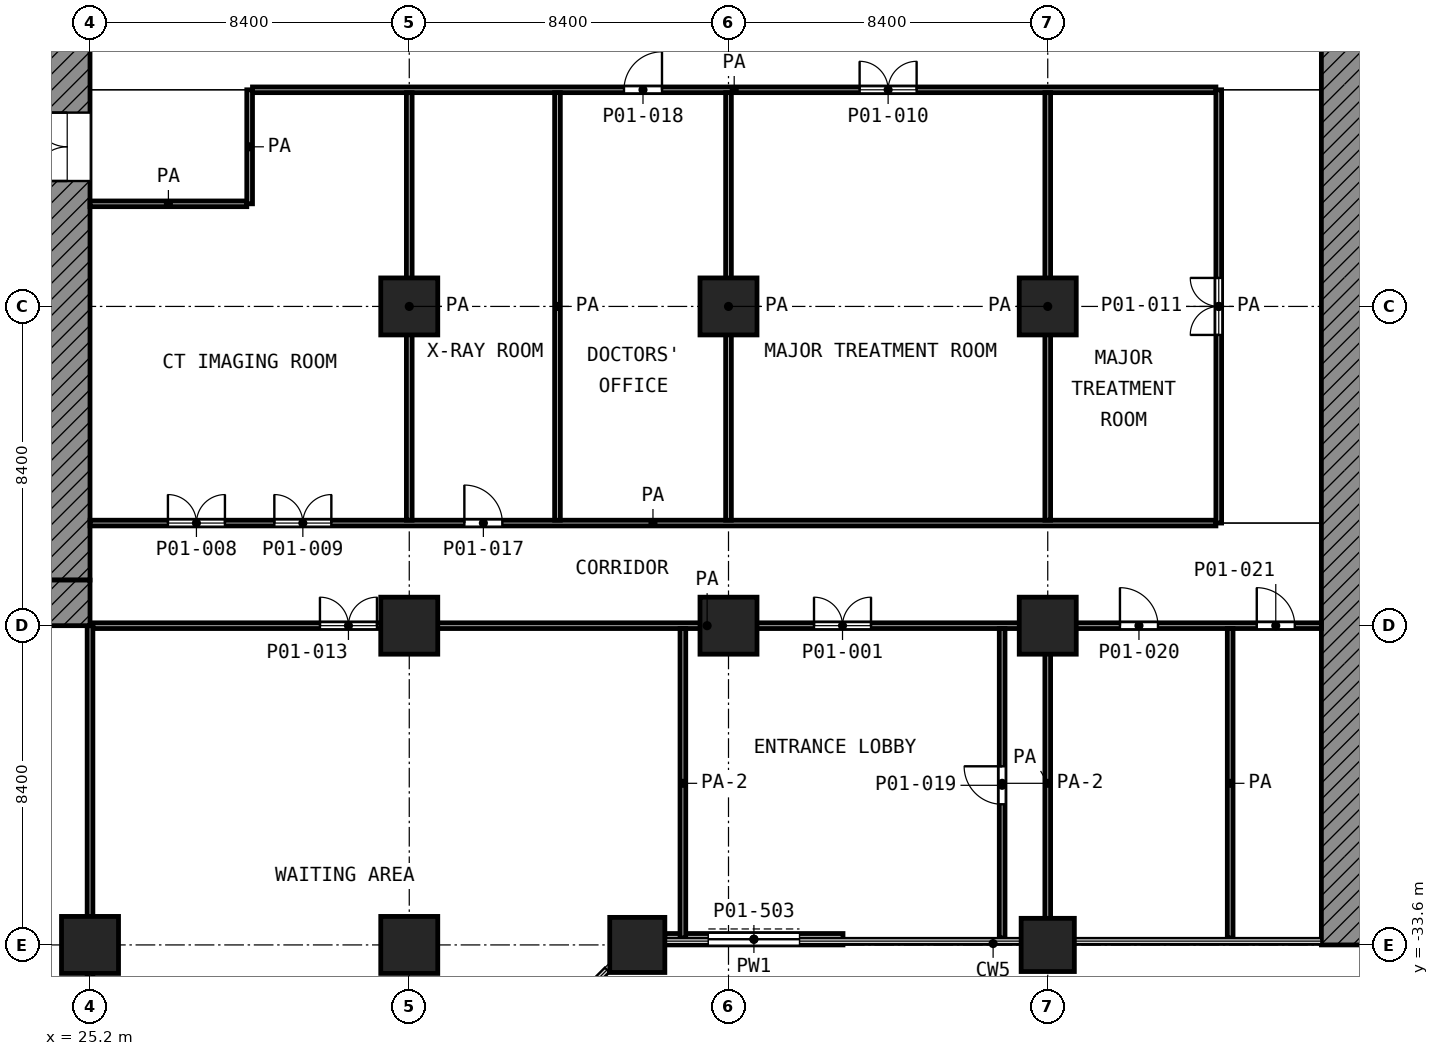
"""IFC4 building model, lengths in metres.
Left out: names, types, materials, properties, quantities, classifications, styles, units other than length and angle.
Written with IfcOpenShell. Run it as: python <this file> out.ifc"""

import sys

from ifc_helpers import new_model, si_unit, direction, frame, frame_2d, origin, origin_2d, place, context, subcontext, project, spatial, polyline, rectangle, outline, extrude, element, fill, save


model = new_model("IFC4")
c1 = context("Model", 3, precision=1e-05, world=origin(), true_north=direction((0.0, 1.0)))
c2 = subcontext(c1, "Body", "Model", "MODEL_VIEW")
j1 = project(units=[si_unit("LENGTHUNIT", "METRE"), si_unit("PLANEANGLEUNIT", "RADIAN")], contexts=[c1])
p1 = place(None, origin())
s1 = spatial("IfcSite", under=j1, at=p1, CompositionType="ELEMENT")
p2 = place(p1, origin())
s2 = spatial("IfcBuilding", under=s1, at=p2, CompositionType="ELEMENT")
p3 = place(p2, origin())
s3 = spatial("IfcBuildingStorey", under=s2, at=p3, CompositionType="ELEMENT", Elevation=0.0)
for number, where, z_axis, x_axis in (
    (1, (33.6, -16.8, 0.0), (0.0, 0.0, 1.0), (1.0, 0.0, 0.0)),
    (2, (42.0, -16.8, 0.0), (0.0, 0.0, 1.0), (1.0, 0.0, 0.0)),
    (3, (50.4, -16.8, 0.0), (0.0, 0.0, 1.0), (1.0, 0.0, 0.0)),
    (4, (33.6, -25.2, 0.0), (0.0, 0.0, 1.0), (1.0, 0.0, 0.0)),
    (5, (42.0, -25.2, 0.0), (0.0, 0.0, 1.0), (1.0, 0.0, 0.0)),
    (6, (50.4, -25.2, 0.0), (0.0, 0.0, 1.0), (1.0, 0.0, 0.0)),
    (7, (25.2, -33.6, 0.0), (0.0, 0.0, 1.0), (1.0, 0.0, 0.0)),
    (8, (33.6, -33.6, 0.0), (0.0, 0.0, 1.0), (1.0, 0.0, 0.0)),
):
    element("IfcColumn", number, at=place(p3, frame(where, z_axis=z_axis, x_axis=x_axis)), inside=s3, PredefinedType="COLUMN", context=c2, shape_type="SweptSolid", body=[
        extrude(rectangle(XDim=1.5, YDim=1.5, at=origin_2d()), origin(), (0.0, 0.0, 1.0), 7.0),
    ])
p4 = place(p3, frame((39.6, -33.6, 0.0), z_axis=(0.0, 0.0, 1.0), x_axis=(1.0, 0.0, 0.0)))
e9 = element("IfcColumn", 9, at=p4, inside=s3, PredefinedType="COLUMN", context=c2, shape_type="SweptSolid", body=[
    extrude(rectangle(XDim=1.45, YDim=1.45, at=origin_2d()), origin(), (0.0, 0.0, 1.0), 7.0),
])
p5 = place(p3, frame((50.4, -33.6, 0.0), z_axis=(0.0, 0.0, 1.0), x_axis=(1.0, 0.0, 0.0)))
e10 = element("IfcColumn", 10, at=p5, inside=s3, PredefinedType="COLUMN", context=c2, shape_type="SweptSolid", body=[
    extrude(rectangle(XDim=1.4, YDim=1.4, at=origin_2d()), origin(), (0.0, 0.0, 1.0), 7.0),
])
p6 = place(p3, frame((0.0, 0.0, 0.0), z_axis=(0.0, -1.0, 0.0), x_axis=(1.0, 0.0, 0.0)))
e11 = element("IfcWall", 11, at=p6, inside=s3, PredefinedType="SHEAR", context=c2, shape_type="SweptSolid", body=[
    extrude(outline(polyline([(60.0, 7.0), (60.0, 6.75), (60.0, 4.5), (60.0, 2.25), (60.0, 0.0), (57.6, 0.0), (57.6, 7.0), (60.0, 7.0)])), origin(), (0.0, 0.0, 1.0), 33.6),
])
p7 = place(p3, frame((40.325, -33.45, 0.0), z_axis=(0.0, 0.0, 1.0), x_axis=(1.0, 0.0, 0.0)))
e12 = element("IfcWall", 12, at=p7, inside=s3, PredefinedType="SOLIDWALL", context=c2, shape_type="SweptSolid", body=[
    extrude(rectangle(XDim=4.688, YDim=0.3, at=frame_2d((2.344, 0.0))), origin(), (0.0, 0.0, 1.0), 5.25),
])
p8 = place(p7, frame((1.144, 0.0, 0.0)))
e13 = element("IfcOpeningElement", 13, at=p8, cuts=e12, PredefinedType="OPENING", context=c2, shape_type="SweptSolid", body=[
    extrude(rectangle(XDim=2.4, YDim=2.4, at=frame_2d((1.2, 1.2))), frame((0.0, 0.16, 0.0), z_axis=(0.0, -1.0, 0.0), x_axis=(1.0, 0.0, 0.0)), (0.0, 0.0, 1.0), 0.32),
])
p9 = place(p3, frame((24.6, -24.0, 0.0), z_axis=(0.0, 0.0, 1.0), x_axis=(0.0, 1.0, 0.0)))
e14 = element("IfcWall", 14, at=p9, inside=s3, PredefinedType="SHEAR", context=c2, shape_type="SweptSolid", body=[
    extrude(rectangle(XDim=18.6, YDim=1.2, at=frame_2d((9.3, 0.0))), origin(), (0.0, 0.0, 1.0), 6.65),
])
p10 = place(p9, frame((10.5, 0.0, 0.0)))
e15 = element("IfcOpeningElement", 15, at=p10, cuts=e14, PredefinedType="OPENING", context=c2, shape_type="SweptSolid", body=[
    extrude(rectangle(XDim=1.8, YDim=2.1, at=frame_2d((0.9, 1.05))), frame((0.0, 0.61, 0.0), z_axis=(0.0, -1.0, 0.0), x_axis=(1.0, 0.0, 0.0)), (0.0, 0.0, 1.0), 1.22),
])
p11 = place(p3, frame((24.6, -25.2, 0.0), z_axis=(0.0, 0.0, 1.0), x_axis=(0.0, 1.0, 0.0)))
e16 = element("IfcWall", 16, at=p11, inside=s3, PredefinedType="SHEAR", context=c2, shape_type="SweptSolid", body=[
    extrude(rectangle(XDim=1.2, YDim=1.2, at=frame_2d((0.6, 0.0))), origin(), (0.0, 0.0, 1.0), 6.65),
])
p12 = place(p3, frame((25.275, -25.2, 0.0), z_axis=(0.0, 0.0, 1.0), x_axis=(1.0, 0.0, 0.0)))
e17 = element("IfcWall", 17, at=p12, inside=s3, PredefinedType="PARTITIONING", context=c2, shape_type="SweptSolid", body=[
    extrude(rectangle(XDim=32.325, YDim=0.15, at=frame_2d((16.163, 0.0))), origin(), (0.0, 0.0, 1.0), 6.65),
])
p13 = place(p12, frame((18.975, 0.0, 0.0)))
e18 = element("IfcOpeningElement", 18, at=p13, cuts=e17, PredefinedType="OPENING", context=c2, shape_type="SweptSolid", body=[
    extrude(rectangle(XDim=1.5, YDim=2.1, at=frame_2d((0.75, 1.05))), frame((0.0, 0.085, 0.0), z_axis=(0.0, -1.0, 0.0), x_axis=(1.0, 0.0, 0.0)), (0.0, 0.0, 1.0), 0.17),
])
p14 = place(p12, frame((5.975, 0.0, 0.0)))
e19 = element("IfcOpeningElement", 19, at=p14, cuts=e17, PredefinedType="OPENING", context=c2, shape_type="SweptSolid", body=[
    extrude(rectangle(XDim=1.5, YDim=2.1, at=frame_2d((0.75, 1.05))), frame((0.0, 0.085, 0.0), z_axis=(0.0, -1.0, 0.0), x_axis=(1.0, 0.0, 0.0)), (0.0, 0.0, 1.0), 0.17),
])
p15 = place(p12, frame((27.025, 0.0, 0.0)))
e20 = element("IfcOpeningElement", 20, at=p15, cuts=e17, PredefinedType="OPENING", context=c2, shape_type="SweptSolid", body=[
    extrude(rectangle(XDim=1.0, YDim=2.1, at=frame_2d((0.5, 1.05))), frame((0.0, 0.085, 0.0), z_axis=(0.0, -1.0, 0.0), x_axis=(1.0, 0.0, 0.0)), (0.0, 0.0, 1.0), 0.17),
])
p16 = place(p12, frame((30.625, 0.0, 0.0)))
e21 = element("IfcOpeningElement", 21, at=p16, cuts=e17, PredefinedType="OPENING", context=c2, shape_type="SweptSolid", body=[
    extrude(rectangle(XDim=1.0, YDim=2.1, at=frame_2d((0.5, 1.05))), frame((0.0, 0.085, 0.0), z_axis=(0.0, -1.0, 0.0), x_axis=(1.0, 0.0, 0.0)), (0.0, 0.0, 1.0), 0.17),
])
p17 = place(p3, frame((25.2, -22.5, 0.0), z_axis=(0.0, 0.0, 1.0), x_axis=(1.0, 0.0, 0.0)))
e22 = element("IfcWall", 22, at=p17, inside=s3, PredefinedType="PARTITIONING", context=c2, shape_type="SweptSolid", body=[
    extrude(rectangle(XDim=29.625, YDim=0.15, at=frame_2d((14.812, 0.0))), origin(), (0.0, 0.0, 1.0), 6.65),
])
p18 = place(p17, frame((2.05, 0.0, 0.0)))
e23 = element("IfcOpeningElement", 23, at=p18, cuts=e22, PredefinedType="OPENING", context=c2, shape_type="SweptSolid", body=[
    extrude(rectangle(XDim=1.5, YDim=2.1, at=frame_2d((0.75, 1.05))), frame((0.0, 0.085, 0.0), z_axis=(0.0, -1.0, 0.0), x_axis=(1.0, 0.0, 0.0)), (0.0, 0.0, 1.0), 0.17),
])
p19 = place(p17, frame((4.85, 0.0, 0.0)))
e24 = element("IfcOpeningElement", 24, at=p19, cuts=e22, PredefinedType="OPENING", context=c2, shape_type="SweptSolid", body=[
    extrude(rectangle(XDim=1.5, YDim=2.1, at=frame_2d((0.75, 1.05))), frame((0.0, 0.085, 0.0), z_axis=(0.0, -1.0, 0.0), x_axis=(1.0, 0.0, 0.0)), (0.0, 0.0, 1.0), 0.17),
])
p20 = place(p17, frame((9.85, 0.0, 0.0)))
e25 = element("IfcOpeningElement", 25, at=p20, cuts=e22, PredefinedType="OPENING", context=c2, shape_type="SweptSolid", body=[
    extrude(rectangle(XDim=1.0, YDim=2.1, at=frame_2d((0.5, 1.05))), frame((0.0, 0.085, 0.0), z_axis=(0.0, -1.0, 0.0), x_axis=(1.0, 0.0, 0.0)), (0.0, 0.0, 1.0), 0.17),
])
p21 = place(p3, frame((25.2, -14.1, 0.0), z_axis=(0.0, 0.0, 1.0), x_axis=(1.0, 0.0, 0.0)))
e26 = element("IfcWall", 26, at=p21, inside=s3, PredefinedType="PARTITIONING", context=c2, shape_type="SweptSolid", body=[
    extrude(rectangle(XDim=4.125, YDim=0.15, at=frame_2d((2.062, 0.0))), origin(), (0.0, 0.0, 1.0), 6.65),
])
p22 = place(p3, frame((29.475, -11.1, 0.0), z_axis=(0.0, 0.0, 1.0), x_axis=(1.0, 0.0, 0.0)))
e27 = element("IfcWall", 27, at=p22, inside=s3, PredefinedType="PARTITIONING", context=c2, shape_type="SweptSolid", body=[
    extrude(rectangle(XDim=25.35, YDim=0.15, at=frame_2d((12.675, 0.0))), origin(), (0.0, 0.0, 1.0), 6.65),
])
p23 = place(p22, frame((9.775, 0.0, 0.0)))
e28 = element("IfcOpeningElement", 28, at=p23, cuts=e27, PredefinedType="OPENING", context=c2, shape_type="SweptSolid", body=[
    extrude(rectangle(XDim=1.0, YDim=2.1, at=frame_2d((0.5, 1.05))), frame((0.0, 0.085, 0.0), z_axis=(0.0, -1.0, 0.0), x_axis=(1.0, 0.0, 0.0)), (0.0, 0.0, 1.0), 0.17),
])
p24 = place(p22, frame((15.975, 0.0, 0.0)))
e29 = element("IfcOpeningElement", 29, at=p24, cuts=e27, PredefinedType="OPENING", context=c2, shape_type="SweptSolid", body=[
    extrude(rectangle(XDim=1.5, YDim=2.1, at=frame_2d((0.75, 1.05))), frame((0.0, 0.085, 0.0), z_axis=(0.0, -1.0, 0.0), x_axis=(1.0, 0.0, 0.0)), (0.0, 0.0, 1.0), 0.17),
])
p25 = place(p3, frame((25.2, -49.199, 0.0), z_axis=(0.0, 0.0, 1.0), x_axis=(0.0, 1.0, 0.0)))
e30 = element("IfcWall", 30, at=p25, inside=s3, PredefinedType="PARTITIONING", context=c2, shape_type="SweptSolid", body=[
    extrude(rectangle(XDim=23.999, YDim=0.15, at=frame_2d((12.0, 0.0))), origin(), (0.0, 0.0, 1.0), 6.65),
])
p26 = place(p25, frame((3.45, 0.0, 0.0)))
e31 = element("IfcOpeningElement", 31, at=p26, cuts=e30, PredefinedType="OPENING", context=c2, shape_type="SweptSolid", body=[
    extrude(rectangle(XDim=1.5, YDim=2.1, at=frame_2d((0.75, 1.05))), frame((0.0, 0.085, 0.0), z_axis=(0.0, -1.0, 0.0), x_axis=(1.0, 0.0, 0.0)), (0.0, 0.0, 1.0), 0.17),
])
p27 = place(p3, frame((29.4, -14.1, 0.0), z_axis=(0.0, 0.0, 1.0), x_axis=(0.0, 1.0, 0.0)))
e32 = element("IfcWall", 32, at=p27, inside=s3, PredefinedType="PARTITIONING", context=c2, shape_type="SweptSolid", body=[
    extrude(rectangle(XDim=3.0, YDim=0.15, at=frame_2d((1.5, 0.0))), origin(), (0.0, 0.0, 1.0), 6.65),
])
for number, where, z_axis, x_axis in (
    (33, (33.6, -22.425, 0.0), (0.0, 0.0, 1.0), (0.0, 1.0, 0.0)),
    (34, (37.5, -22.425, 0.0), (0.0, 0.0, 1.0), (0.0, 1.0, 0.0)),
):
    element("IfcWall", number, at=place(p3, frame(where, z_axis=z_axis, x_axis=x_axis)), inside=s3, PredefinedType="PARTITIONING", context=c2, shape_type="SweptSolid", body=[
        extrude(rectangle(XDim=11.25, YDim=0.15, at=frame_2d((5.625, 0.0))), origin(), (0.0, 0.0, 1.0), 6.65),
    ])
p28 = place(p3, frame((40.8, -33.42, 0.0), z_axis=(0.0, 0.0, 1.0), x_axis=(0.0, 1.0, 0.0)))
e35 = element("IfcWall", 35, at=p28, inside=s3, PredefinedType="PARTITIONING", context=c2, shape_type="SweptSolid", body=[
    extrude(rectangle(XDim=8.145, YDim=0.15, at=frame_2d((4.073, 0.0))), origin(), (0.0, 0.0, 1.0), 5.25),
])
p29 = place(p3, frame((42.0, -22.425, 0.0), z_axis=(0.0, 0.0, 1.0), x_axis=(0.0, 1.0, 0.0)))
e36 = element("IfcWall", 36, at=p29, inside=s3, PredefinedType="PARTITIONING", context=c2, shape_type="SweptSolid", body=[
    extrude(rectangle(XDim=11.25, YDim=0.15, at=frame_2d((5.625, 0.0))), origin(), (0.0, 0.0, 1.0), 6.65),
])
p30 = place(p3, frame((49.2, -33.42, 0.0), z_axis=(0.0, 0.0, 1.0), x_axis=(0.0, 1.0, 0.0)))
e37 = element("IfcWall", 37, at=p30, inside=s3, PredefinedType="PARTITIONING", context=c2, shape_type="SweptSolid", body=[
    extrude(rectangle(XDim=8.145, YDim=0.15, at=frame_2d((4.073, 0.0))), origin(), (0.0, 0.0, 1.0), 5.25),
])
p31 = place(p30, frame((3.52, 0.0, 0.0)))
e38 = element("IfcOpeningElement", 38, at=p31, cuts=e37, PredefinedType="OPENING", context=c2, shape_type="SweptSolid", body=[
    extrude(rectangle(XDim=1.0, YDim=2.1, at=frame_2d((0.5, 1.05))), frame((0.0, 0.085, 0.0), z_axis=(0.0, -1.0, 0.0), x_axis=(1.0, 0.0, 0.0)), (0.0, 0.0, 1.0), 0.17),
])
p32 = place(p3, frame((50.4, -33.42, 0.0), z_axis=(0.0, 0.0, 1.0), x_axis=(0.0, 1.0, 0.0)))
e39 = element("IfcWall", 39, at=p32, inside=s3, PredefinedType="PARTITIONING", context=c2, shape_type="SweptSolid", body=[
    extrude(rectangle(XDim=8.145, YDim=0.15, at=frame_2d((4.073, 0.0))), origin(), (0.0, 0.0, 1.0), 6.65),
])
p33 = place(p3, frame((50.4, -22.425, 0.0), z_axis=(0.0, 0.0, 1.0), x_axis=(0.0, 1.0, 0.0)))
e40 = element("IfcWall", 40, at=p33, inside=s3, PredefinedType="PARTITIONING", context=c2, shape_type="SweptSolid", body=[
    extrude(rectangle(XDim=11.25, YDim=0.15, at=frame_2d((5.625, 0.0))), origin(), (0.0, 0.0, 1.0), 6.65),
])
p34 = place(p3, frame((54.9, -22.5, 0.0), z_axis=(0.0, 0.0, 1.0), x_axis=(0.0, 1.0, 0.0)))
e41 = element("IfcWall", 41, at=p34, inside=s3, PredefinedType="PARTITIONING", context=c2, shape_type="SweptSolid", body=[
    extrude(rectangle(XDim=11.4, YDim=0.15, at=frame_2d((5.7, 0.0))), origin(), (0.0, 0.0, 1.0), 6.65),
])
p35 = place(p34, frame((4.95, 0.0, 0.0)))
e42 = element("IfcOpeningElement", 42, at=p35, cuts=e41, PredefinedType="OPENING", context=c2, shape_type="SweptSolid", body=[
    extrude(rectangle(XDim=1.5, YDim=2.1, at=frame_2d((0.75, 1.05))), frame((0.0, 0.085, 0.0), z_axis=(0.0, -1.0, 0.0), x_axis=(1.0, 0.0, 0.0)), (0.0, 0.0, 1.0), 0.17),
])
p36 = place(p3, frame((55.2, -33.42, 0.0), z_axis=(0.0, 0.0, 1.0), x_axis=(0.0, 1.0, 0.0)))
e43 = element("IfcWall", 43, at=p36, inside=s3, PredefinedType="PARTITIONING", context=c2, shape_type="SweptSolid", body=[
    extrude(rectangle(XDim=8.145, YDim=0.15, at=frame_2d((4.073, 0.0))), origin(), (0.0, 0.0, 1.0), 6.65),
])
p37 = place(p8, origin())
e44 = element("IfcDoor", 44, at=p37, inside=s3, OperationType="DOUBLE_DOOR_SLIDING", PredefinedType="DOOR", context=c2, shape_type="SweptSolid", body=[
    extrude(rectangle(XDim=2.4, YDim=2.4, at=frame_2d((1.2, 1.2))), frame((0.0, 0.025, 0.0), z_axis=(0.0, -1.0, 0.0), x_axis=(1.0, 0.0, 0.0)), (0.0, 0.0, 1.0), 0.05),
])
fill(e13, e44)
p38 = place(p10, origin())
e45 = element("IfcDoor", 45, at=p38, inside=s3, OperationType="DOUBLE_DOOR_SINGLE_SWING", PredefinedType="DOOR", context=c2, shape_type="SweptSolid", body=[
    extrude(rectangle(XDim=1.8, YDim=2.1, at=frame_2d((0.9, 1.05))), frame((0.0, 0.025, 0.0), z_axis=(0.0, -1.0, 0.0), x_axis=(1.0, 0.0, 0.0)), (0.0, 0.0, 1.0), 0.05),
])
fill(e15, e45)
p39 = place(p13, origin())
e46 = element("IfcDoor", 46, at=p39, inside=s3, OperationType="DOUBLE_DOOR_SINGLE_SWING", PredefinedType="DOOR", context=c2, shape_type="SweptSolid", body=[
    extrude(rectangle(XDim=1.5, YDim=2.1, at=frame_2d((0.75, 1.05))), frame((0.0, 0.025, 0.0), z_axis=(0.0, -1.0, 0.0), x_axis=(1.0, 0.0, 0.0)), (0.0, 0.0, 1.0), 0.05),
])
fill(e18, e46)
p40 = place(p18, origin())
e47 = element("IfcDoor", 47, at=p40, inside=s3, OperationType="DOUBLE_DOOR_SINGLE_SWING", PredefinedType="DOOR", context=c2, shape_type="SweptSolid", body=[
    extrude(rectangle(XDim=1.5, YDim=2.1, at=frame_2d((0.75, 1.05))), frame((0.0, 0.025, 0.0), z_axis=(0.0, -1.0, 0.0), x_axis=(1.0, 0.0, 0.0)), (0.0, 0.0, 1.0), 0.05),
])
fill(e23, e47)
p41 = place(p19, origin())
e48 = element("IfcDoor", 48, at=p41, inside=s3, OperationType="DOUBLE_DOOR_SINGLE_SWING", PredefinedType="DOOR", context=c2, shape_type="SweptSolid", body=[
    extrude(rectangle(XDim=1.5, YDim=2.1, at=frame_2d((0.75, 1.05))), frame((0.0, 0.025, 0.0), z_axis=(0.0, -1.0, 0.0), x_axis=(1.0, 0.0, 0.0)), (0.0, 0.0, 1.0), 0.05),
])
fill(e24, e48)
p42 = place(p20, origin())
e49 = element("IfcDoor", 49, at=p42, inside=s3, OperationType="SINGLE_SWING_LEFT", PredefinedType="DOOR", context=c2, shape_type="SweptSolid", body=[
    extrude(rectangle(XDim=1.0, YDim=2.1, at=frame_2d((0.5, 1.05))), frame((0.0, 0.025, 0.0), z_axis=(0.0, -1.0, 0.0), x_axis=(1.0, 0.0, 0.0)), (0.0, 0.0, 1.0), 0.05),
])
fill(e25, e49)
p43 = place(p23, origin())
e50 = element("IfcDoor", 50, at=p43, inside=s3, OperationType="SINGLE_SWING_RIGHT", PredefinedType="DOOR", context=c2, shape_type="SweptSolid", body=[
    extrude(rectangle(XDim=1.0, YDim=2.1, at=frame_2d((0.5, 1.05))), frame((0.0, 0.025, 0.0), z_axis=(0.0, -1.0, 0.0), x_axis=(1.0, 0.0, 0.0)), (0.0, 0.0, 1.0), 0.05),
])
fill(e28, e50)
p44 = place(p24, origin())
e51 = element("IfcDoor", 51, at=p44, inside=s3, OperationType="DOUBLE_DOOR_SINGLE_SWING", PredefinedType="DOOR", context=c2, shape_type="SweptSolid", body=[
    extrude(rectangle(XDim=1.5, YDim=2.1, at=frame_2d((0.75, 1.05))), frame((0.0, 0.025, 0.0), z_axis=(0.0, -1.0, 0.0), x_axis=(1.0, 0.0, 0.0)), (0.0, 0.0, 1.0), 0.05),
])
fill(e29, e51)
p45 = place(p35, origin())
e52 = element("IfcDoor", 52, at=p45, inside=s3, OperationType="DOUBLE_DOOR_SINGLE_SWING", PredefinedType="DOOR", context=c2, shape_type="SweptSolid", body=[
    extrude(rectangle(XDim=1.5, YDim=2.1, at=frame_2d((0.75, 1.05))), frame((0.0, 0.025, 0.0), z_axis=(0.0, -1.0, 0.0), x_axis=(1.0, 0.0, 0.0)), (0.0, 0.0, 1.0), 0.05),
])
fill(e42, e52)
p46 = place(p14, origin())
e53 = element("IfcDoor", 53, at=p46, inside=s3, OperationType="DOUBLE_DOOR_SINGLE_SWING", PredefinedType="DOOR", context=c2, shape_type="SweptSolid", body=[
    extrude(rectangle(XDim=1.5, YDim=2.1, at=frame_2d((0.75, 1.05))), frame((0.0, 0.025, 0.0), z_axis=(0.0, -1.0, 0.0), x_axis=(1.0, 0.0, 0.0)), (0.0, 0.0, 1.0), 0.05),
])
fill(e19, e53)
p47 = place(p31, origin())
e54 = element("IfcDoor", 54, at=p47, inside=s3, OperationType="SINGLE_SWING_RIGHT", PredefinedType="DOOR", context=c2, shape_type="SweptSolid", body=[
    extrude(rectangle(XDim=1.0, YDim=2.1, at=frame_2d((0.5, 1.05))), frame((0.0, 0.025, 0.0), z_axis=(0.0, -1.0, 0.0), x_axis=(1.0, 0.0, 0.0)), (0.0, 0.0, 1.0), 0.05),
])
fill(e38, e54)
p48 = place(p15, origin())
e55 = element("IfcDoor", 55, at=p48, inside=s3, OperationType="SINGLE_SWING_LEFT", PredefinedType="DOOR", context=c2, shape_type="SweptSolid", body=[
    extrude(rectangle(XDim=1.0, YDim=2.1, at=frame_2d((0.5, 1.05))), frame((0.0, 0.025, 0.0), z_axis=(0.0, -1.0, 0.0), x_axis=(1.0, 0.0, 0.0)), (0.0, 0.0, 1.0), 0.05),
])
fill(e20, e55)
p49 = place(p16, origin())
e56 = element("IfcDoor", 56, at=p49, inside=s3, OperationType="SINGLE_SWING_LEFT", PredefinedType="DOOR", context=c2, shape_type="SweptSolid", body=[
    extrude(rectangle(XDim=1.0, YDim=2.1, at=frame_2d((0.5, 1.05))), frame((0.0, 0.025, 0.0), z_axis=(0.0, -1.0, 0.0), x_axis=(1.0, 0.0, 0.0)), (0.0, 0.0, 1.0), 0.05),
])
fill(e21, e56)
save(model, sys.argv[1])
